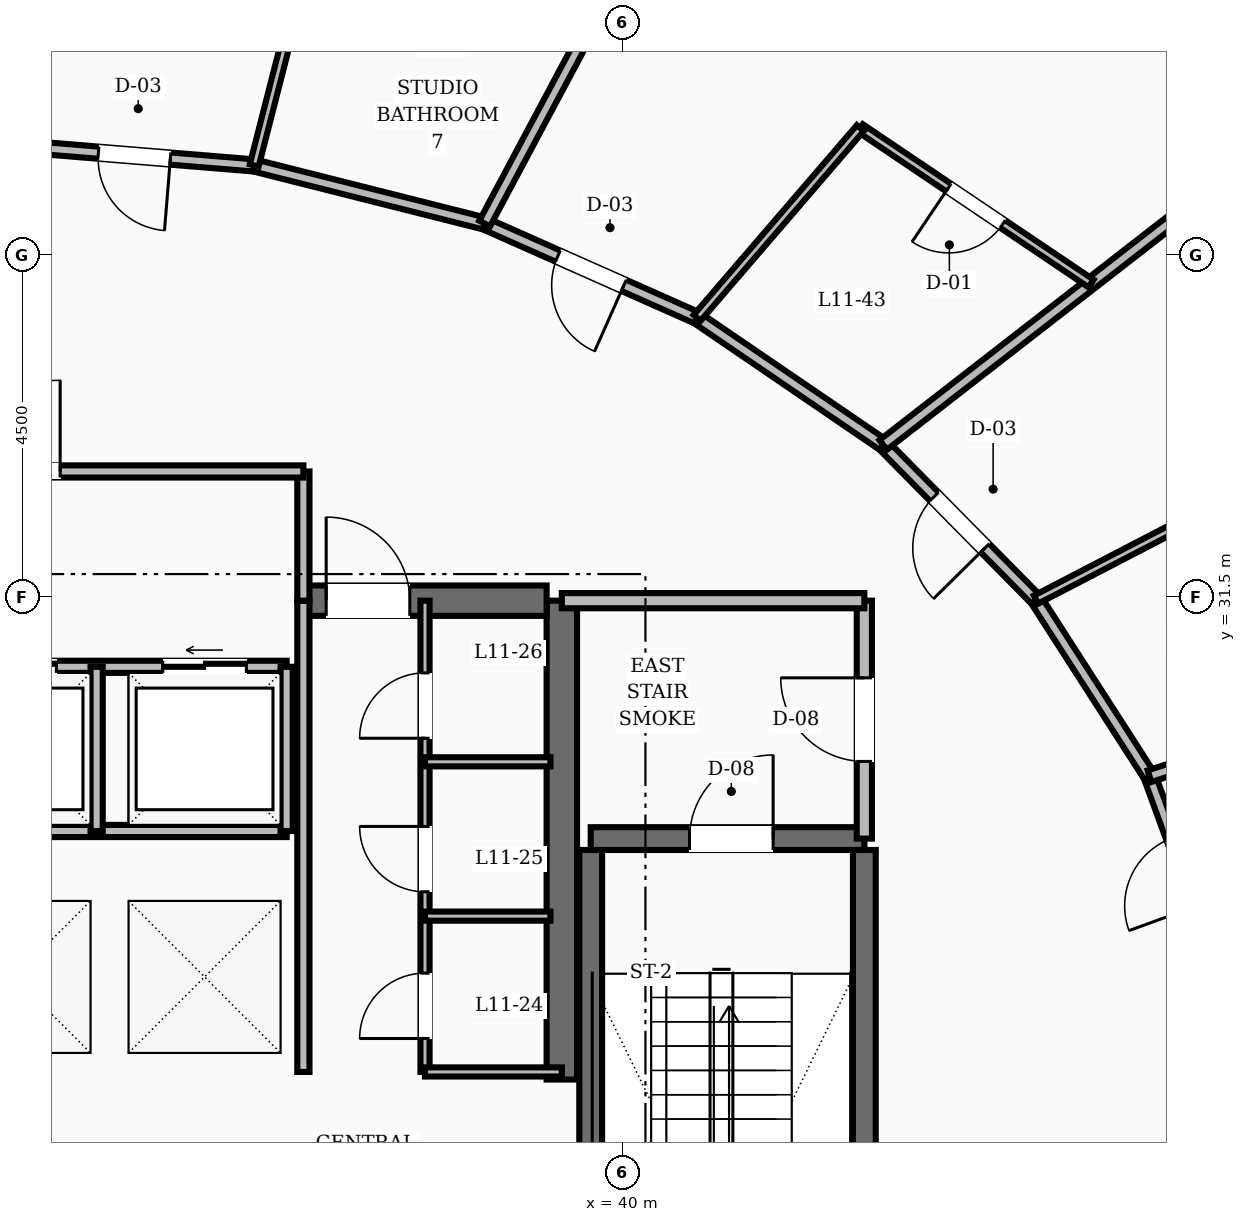
"""IFC4 building model, lengths in metres.
Left out: names, types, materials, properties, quantities, classifications, styles, units other than length and angle.
Written with IfcOpenShell. Run it as: python <this file> out.ifc"""

import sys

from ifc_helpers import new_model, si_unit, direction, frame, frame_2d, origin, place, context, subcontext, project, spatial, rectangle, extrude, element, fill, save


model = new_model("IFC4")
c1 = context("Model", 3, precision=1e-05, world=origin(), true_north=direction((0.0, 1.0)))
c2 = subcontext(c1, "Body", "Model", "MODEL_VIEW")
j1 = project(units=[si_unit("LENGTHUNIT", "METRE"), si_unit("PLANEANGLEUNIT", "RADIAN")], contexts=[c1])
p1 = place(None, origin())
s1 = spatial("IfcSite", under=j1, at=p1, CompositionType="ELEMENT")
p2 = place(p1, origin())
s2 = spatial("IfcBuilding", under=s1, at=p2, CompositionType="ELEMENT")
p3 = place(p2, frame((0.0, 0.0, 48.4)))
s3 = spatial("IfcBuildingStorey", under=s2, at=p3, CompositionType="ELEMENT", Elevation=48.4)
p4 = place(p3, frame((39.2, 25.15, 0.0), z_axis=(0.0, 0.0, 1.0), x_axis=(0.0, 1.0, 0.0)))
e1 = element("IfcWall", 1, at=p4, inside=s3, PredefinedType="SHEAR", context=c2, shape_type="SweptSolid", body=[
    extrude(rectangle(XDim=6.3, YDim=0.4, at=frame_2d((3.15, 0.0))), origin(), (0.0, 0.0, 1.0), 3.6),
])
p5 = place(p3, frame((35.8, 31.45, 0.0), z_axis=(0.0, 0.0, 1.0), x_axis=(1.0, 0.0, 0.0)))
e2 = element("IfcWall", 2, at=p5, inside=s3, PredefinedType="SHEAR", context=c2, shape_type="SweptSolid", body=[
    extrude(rectangle(XDim=3.2, YDim=0.4, at=frame_2d((1.6, 0.0))), origin(), (0.0, 0.0, 1.0), 3.6),
])
p6 = place(p5, frame((0.3, 0.0, 0.0)))
e3 = element("IfcOpeningElement", 3, at=p6, cuts=e2, PredefinedType="OPENING", context=c2, shape_type="SweptSolid", body=[
    extrude(rectangle(XDim=1.1, YDim=2.1, at=frame_2d((0.55, 1.05))), frame((0.0, 0.21, 0.0), z_axis=(0.0, -1.0, 0.0), x_axis=(1.0, 0.0, 0.0)), (0.0, 0.0, 1.0), 0.42),
])
for number, where, z_axis, x_axis in (
    (4, (43.18, 19.43, 0.0), (0.0, 0.0, 1.0), (0.0, 1.0, 0.0)),
    (5, (39.58, 19.43, 0.0), (0.0, 0.0, 1.0), (0.0, 1.0, 0.0)),
):
    element("IfcWall", number, at=place(p3, frame(where, z_axis=z_axis, x_axis=x_axis)), inside=s3, PredefinedType="SHEAR", context=c2, shape_type="SweptSolid", body=[
        extrude(rectangle(XDim=8.74, YDim=0.3, at=frame_2d((4.37, 0.0))), origin(), (0.0, 0.0, 1.0), 3.6),
    ])
p7 = place(p3, frame((39.58, 28.32, 0.0), z_axis=(0.0, 0.0, 1.0), x_axis=(1.0, 0.0, 0.0)))
e6 = element("IfcWall", 6, at=p7, inside=s3, PredefinedType="SHEAR", context=c2, shape_type="SweptSolid", body=[
    extrude(rectangle(XDim=3.6, YDim=0.3, at=frame_2d((1.8, 0.0))), origin(), (0.0, 0.0, 1.0), 3.6),
])
p8 = place(p7, frame((1.3, 0.0, 0.0)))
e7 = element("IfcOpeningElement", 7, at=p8, cuts=e6, PredefinedType="OPENING", context=c2, shape_type="SweptSolid", body=[
    extrude(rectangle(XDim=1.1, YDim=2.1, at=frame_2d((0.55, 1.05))), frame((0.0, 0.16, 0.0), z_axis=(0.0, -1.0, 0.0), x_axis=(1.0, 0.0, 0.0)), (0.0, 0.0, 1.0), 0.32),
])
p9 = place(p3, frame((43.18, 28.32, 0.0), z_axis=(0.0, 0.0, 1.0), x_axis=(0.0, 1.0, 0.0)))
e8 = element("IfcWall", 8, at=p9, inside=s3, PredefinedType="SOLIDWALL", context=c2, shape_type="SweptSolid", body=[
    extrude(rectangle(XDim=3.13, YDim=0.2, at=frame_2d((1.565, 0.0))), origin(), (0.0, 0.0, 1.0), 2.61),
])
p10 = place(p9, frame((1.015, 0.0, 0.0)))
e9 = element("IfcOpeningElement", 9, at=p10, cuts=e8, PredefinedType="OPENING", context=c2, shape_type="SweptSolid", body=[
    extrude(rectangle(XDim=1.1, YDim=2.1, at=frame_2d((0.55, 1.05))), frame((0.0, 0.11, 0.0), z_axis=(0.0, -1.0, 0.0), x_axis=(1.0, 0.0, 0.0)), (0.0, 0.0, 1.0), 0.22),
])
p11 = place(p3, frame((39.2, 31.45, 0.0), z_axis=(0.0, 0.0, 1.0), x_axis=(1.0, 0.0, 0.0)))
e10 = element("IfcWall", 10, at=p11, inside=s3, PredefinedType="SOLIDWALL", context=c2, shape_type="SweptSolid", body=[
    extrude(rectangle(XDim=3.98, YDim=0.2, at=frame_2d((1.99, 0.0))), origin(), (0.0, 0.0, 1.0), 2.61),
])
p12 = place(p3, frame((35.8, 25.25, 0.0), z_axis=(0.0, 0.0, 1.0), x_axis=(0.0, 1.0, 0.0)))
e11 = element("IfcWall", 11, at=p12, inside=s3, PredefinedType="SOLIDWALL", context=c2, shape_type="SweptSolid", body=[
    extrude(rectangle(XDim=6.2, YDim=0.16, at=frame_2d((3.1, 0.0))), origin(), (0.0, 0.0, 1.0), 2.61),
])
p13 = place(p3, frame((28.42, 30.58, 0.0), z_axis=(0.0, 0.0, 1.0), x_axis=(1.0, 0.0, 0.0)))
e12 = element("IfcWall", 12, at=p13, inside=s3, PredefinedType="SOLIDWALL", context=c2, shape_type="SweptSolid", body=[
    extrude(rectangle(XDim=7.16, YDim=0.16, at=frame_2d((3.58, 0.0))), origin(), (0.0, 0.0, 1.0), 2.61),
])
p14 = place(p13, frame((0.53, 0.0, 0.0)))
e13 = element("IfcOpeningElement", 13, at=p14, cuts=e12, PredefinedType="OPENING", context=c2, shape_type="SweptSolid", body=[
    extrude(rectangle(XDim=1.1, YDim=2.15, at=frame_2d((0.55, 1.075))), frame((0.0, 0.09, 0.0), z_axis=(0.0, -1.0, 0.0), x_axis=(1.0, 0.0, 0.0)), (0.0, 0.0, 1.0), 0.18),
])
p15 = place(p13, frame((3.03, 0.0, 0.0)))
e14 = element("IfcOpeningElement", 14, at=p15, cuts=e12, PredefinedType="OPENING", context=c2, shape_type="SweptSolid", body=[
    extrude(rectangle(XDim=1.1, YDim=2.15, at=frame_2d((0.55, 1.075))), frame((0.0, 0.09, 0.0), z_axis=(0.0, -1.0, 0.0), x_axis=(1.0, 0.0, 0.0)), (0.0, 0.0, 1.0), 0.18),
])
p16 = place(p13, frame((5.53, 0.0, 0.0)))
e15 = element("IfcOpeningElement", 15, at=p16, cuts=e12, PredefinedType="OPENING", context=c2, shape_type="SweptSolid", body=[
    extrude(rectangle(XDim=1.1, YDim=2.15, at=frame_2d((0.55, 1.075))), frame((0.0, 0.09, 0.0), z_axis=(0.0, -1.0, 0.0), x_axis=(1.0, 0.0, 0.0)), (0.0, 0.0, 1.0), 0.18),
])
p17 = place(p3, frame((28.42, 28.42, 0.0), z_axis=(0.0, 0.0, 1.0), x_axis=(1.0, 0.0, 0.0)))
e16 = element("IfcWall", 16, at=p17, inside=s3, PredefinedType="SOLIDWALL", context=c2, shape_type="SweptSolid", body=[
    extrude(rectangle(XDim=7.16, YDim=0.16, at=frame_2d((3.58, 0.0))), origin(), (0.0, 0.0, 1.0), 2.61),
])
for number, where, z_axis, x_axis in (
    (17, (33.08, 28.42, 0.0), (0.0, 0.0, 1.0), (0.0, 1.0, 0.0)),
    (18, (35.58, 28.42, 0.0), (0.0, 0.0, 1.0), (0.0, 1.0, 0.0)),
):
    element("IfcWall", number, at=place(p3, frame(where, z_axis=z_axis, x_axis=x_axis)), inside=s3, PredefinedType="SOLIDWALL", context=c2, shape_type="SweptSolid", body=[
        extrude(rectangle(XDim=2.16, YDim=0.16, at=frame_2d((1.08, 0.0))), origin(), (0.0, 0.0, 1.0), 2.61),
    ])
p18 = place(p3, frame((35.8, 31.45, 0.0), z_axis=(0.0, 0.0, 1.0), x_axis=(0.0, 1.0, 0.0)))
e19 = element("IfcWall", 19, at=p18, inside=s3, PredefinedType="SOLIDWALL", context=c2, shape_type="SweptSolid", body=[
    extrude(rectangle(XDim=1.7, YDim=0.16, at=frame_2d((0.85, 0.0))), origin(), (0.0, 0.0, 1.0), 2.61),
])
p19 = place(p3, frame((28.2, 33.15, 0.0), z_axis=(0.0, 0.0, 1.0), x_axis=(1.0, 0.0, 0.0)))
e20 = element("IfcWall", 20, at=p19, inside=s3, PredefinedType="SOLIDWALL", context=c2, shape_type="SweptSolid", body=[
    extrude(rectangle(XDim=7.6, YDim=0.16, at=frame_2d((3.8, 0.0))), origin(), (0.0, 0.0, 1.0), 2.61),
])
p20 = place(p19, frame((3.2, 0.0, 0.0)))
e21 = element("IfcOpeningElement", 21, at=p20, cuts=e20, PredefinedType="OPENING", context=c2, shape_type="SweptSolid", body=[
    extrude(rectangle(XDim=1.2, YDim=2.1, at=frame_2d((0.6, 1.05))), frame((0.0, 0.09, 0.0), z_axis=(0.0, -1.0, 0.0), x_axis=(1.0, 0.0, 0.0)), (0.0, 0.0, 1.0), 0.18),
])
p21 = place(p3, frame((37.4, 25.25, 0.0), z_axis=(0.0, 0.0, 1.0), x_axis=(0.0, 1.0, 0.0)))
e22 = element("IfcWall", 22, at=p21, inside=s3, PredefinedType="PARTITIONING", context=c2, shape_type="SweptSolid", body=[
    extrude(rectangle(XDim=6.2, YDim=0.12, at=frame_2d((3.1, 0.0))), origin(), (0.0, 0.0, 1.0), 2.61),
])
p22 = place(p21, frame((0.44, 0.0, 0.0)))
e23 = element("IfcOpeningElement", 23, at=p22, cuts=e22, PredefinedType="OPENING", context=c2, shape_type="SweptSolid", body=[
    extrude(rectangle(XDim=0.86, YDim=2.1, at=frame_2d((0.43, 1.05))), frame((0.0, 0.07, 0.0), z_axis=(0.0, -1.0, 0.0), x_axis=(1.0, 0.0, 0.0)), (0.0, 0.0, 1.0), 0.14),
])
p23 = place(p21, frame((2.37, 0.0, 0.0)))
e24 = element("IfcOpeningElement", 24, at=p23, cuts=e22, PredefinedType="OPENING", context=c2, shape_type="SweptSolid", body=[
    extrude(rectangle(XDim=0.86, YDim=2.1, at=frame_2d((0.43, 1.05))), frame((0.0, 0.07, 0.0), z_axis=(0.0, -1.0, 0.0), x_axis=(1.0, 0.0, 0.0)), (0.0, 0.0, 1.0), 0.14),
])
p24 = place(p21, frame((4.39, 0.0, 0.0)))
e25 = element("IfcOpeningElement", 25, at=p24, cuts=e22, PredefinedType="OPENING", context=c2, shape_type="SweptSolid", body=[
    extrude(rectangle(XDim=0.86, YDim=2.1, at=frame_2d((0.43, 1.05))), frame((0.0, 0.07, 0.0), z_axis=(0.0, -1.0, 0.0), x_axis=(1.0, 0.0, 0.0)), (0.0, 0.0, 1.0), 0.14),
])
p25 = place(p3, frame((37.4, 25.25, 0.0), z_axis=(0.0, 0.0, 1.0), x_axis=(1.0, 0.0, 0.0)))
e26 = element("IfcWall", 26, at=p25, inside=s3, PredefinedType="PARTITIONING", context=c2, shape_type="SweptSolid", body=[
    extrude(rectangle(XDim=1.8, YDim=0.12, at=frame_2d((0.9, 0.0))), origin(), (0.0, 0.0, 1.0), 2.61),
])
for number, where, z_axis, x_axis in (
    (27, (37.4, 27.3, 0.0), (0.0, 0.0, 1.0), (1.0, 0.0, 0.0)),
    (28, (37.4, 29.33, 0.0), (0.0, 0.0, 1.0), (1.0, 0.0, 0.0)),
):
    element("IfcWall", number, at=place(p3, frame(where, z_axis=z_axis, x_axis=x_axis)), inside=s3, PredefinedType="PARTITIONING", context=c2, shape_type="SweptSolid", body=[
        extrude(rectangle(XDim=1.65, YDim=0.12, at=frame_2d((0.825, 0.0))), origin(), (0.0, 0.0, 1.0), 2.61),
    ])
p26 = place(p3, frame((47.852, 26.621, 0.0), z_axis=(0.0, 0.0, 1.0), x_axis=(-0.342882618672, 0.939378257047, 0.0)))
e29 = element("IfcWall", 29, at=p26, inside=s3, PredefinedType="SOLIDWALL", context=c2, shape_type="SweptSolid", body=[
    extrude(rectangle(XDim=2.683, YDim=0.16, at=frame_2d((1.341, 0.0))), origin(), (0.0, 0.0, 1.0), 2.61),
])
p27 = place(p26, frame((0.866, 0.0, 0.0)))
e30 = element("IfcOpeningElement", 30, at=p27, cuts=e29, PredefinedType="OPENING", context=c2, shape_type="SweptSolid", body=[
    extrude(rectangle(XDim=0.95, YDim=2.1, at=frame_2d((0.475, 1.05))), frame((0.0, 0.09, 0.0), z_axis=(0.0, -1.0, 0.0), x_axis=(1.0, 0.0, 0.0)), (0.0, 0.0, 1.0), 0.18),
])
p28 = place(p3, frame((46.932, 29.141, 0.0), z_axis=(0.0, 0.0, 1.0), x_axis=(-0.540891657444, 0.841092274907, 0.0)))
e31 = element("IfcWall", 31, at=p28, inside=s3, PredefinedType="SOLIDWALL", context=c2, shape_type="SweptSolid", body=[
    extrude(rectangle(XDim=2.761, YDim=0.16, at=frame_2d((1.38, 0.0))), origin(), (0.0, 0.0, 1.0), 2.61),
])
p29 = place(p3, frame((45.438, 31.463, 0.0), z_axis=(0.0, 0.0, 1.0), x_axis=(-0.702569520063, 0.711615113301, 0.0)))
e32 = element("IfcWall", 32, at=p29, inside=s3, PredefinedType="SOLIDWALL", context=c2, shape_type="SweptSolid", body=[
    extrude(rectangle(XDim=2.861, YDim=0.16, at=frame_2d((1.43, 0.0))), origin(), (0.0, 0.0, 1.0), 2.61),
])
p30 = place(p29, frame((0.955, 0.0, 0.0)))
e33 = element("IfcOpeningElement", 33, at=p30, cuts=e32, PredefinedType="OPENING", context=c2, shape_type="SweptSolid", body=[
    extrude(rectangle(XDim=0.95, YDim=2.1, at=frame_2d((0.475, 1.05))), frame((0.0, 0.09, 0.0), z_axis=(0.0, -1.0, 0.0), x_axis=(1.0, 0.0, 0.0)), (0.0, 0.0, 1.0), 0.18),
])
p31 = place(p3, frame((43.428, 33.499, 0.0), z_axis=(0.0, 0.0, 1.0), x_axis=(-0.826112340767, 0.563505457323, 0.0)))
e34 = element("IfcWall", 34, at=p31, inside=s3, PredefinedType="SOLIDWALL", context=c2, shape_type="SweptSolid", body=[
    extrude(rectangle(XDim=2.965, YDim=0.16, at=frame_2d((1.482, 0.0))), origin(), (0.0, 0.0, 1.0), 2.61),
])
p32 = place(p3, frame((40.979, 35.17, 0.0), z_axis=(0.0, 0.0, 1.0), x_axis=(-0.913860932409, 0.406027334321, 0.0)))
e35 = element("IfcWall", 35, at=p32, inside=s3, PredefinedType="SOLIDWALL", context=c2, shape_type="SweptSolid", body=[
    extrude(rectangle(XDim=3.058, YDim=0.16, at=frame_2d((1.529, 0.0))), origin(), (0.0, 0.0, 1.0), 2.61),
])
p33 = place(p32, frame((1.054, 0.0, 0.0)))
e36 = element("IfcOpeningElement", 36, at=p33, cuts=e35, PredefinedType="OPENING", context=c2, shape_type="SweptSolid", body=[
    extrude(rectangle(XDim=0.95, YDim=2.1, at=frame_2d((0.475, 1.05))), frame((0.0, 0.09, 0.0), z_axis=(0.0, -1.0, 0.0), x_axis=(1.0, 0.0, 0.0)), (0.0, 0.0, 1.0), 0.18),
])
p34 = place(p3, frame((38.185, 36.411, 0.0), z_axis=(0.0, 0.0, 1.0), x_axis=(-0.969653665365, 0.244482656326, 0.0)))
e37 = element("IfcWall", 37, at=p34, inside=s3, PredefinedType="SOLIDWALL", context=c2, shape_type="SweptSolid", body=[
    extrude(rectangle(XDim=3.127, YDim=0.16, at=frame_2d((1.563, 0.0))), origin(), (0.0, 0.0, 1.0), 2.61),
])
p35 = place(p3, frame((35.153, 37.176, 0.0), z_axis=(0.0, 0.0, 1.0), x_axis=(-0.996661331307, 0.081646743207, 0.0)))
e38 = element("IfcWall", 38, at=p35, inside=s3, PredefinedType="SOLIDWALL", context=c2, shape_type="SweptSolid", body=[
    extrude(rectangle(XDim=3.164, YDim=0.16, at=frame_2d((1.582, 0.0))), origin(), (0.0, 0.0, 1.0), 2.61),
])
p36 = place(p35, frame((1.107, 0.0, 0.0)))
e39 = element("IfcOpeningElement", 39, at=p36, cuts=e38, PredefinedType="OPENING", context=c2, shape_type="SweptSolid", body=[
    extrude(rectangle(XDim=0.95, YDim=2.1, at=frame_2d((0.475, 1.05))), frame((0.0, 0.09, 0.0), z_axis=(0.0, -1.0, 0.0), x_axis=(1.0, 0.0, 0.0)), (0.0, 0.0, 1.0), 0.18),
])
p37 = place(p3, frame((46.932, 29.141, 0.0), z_axis=(0.0, 0.0, 1.0), x_axis=(0.951948128821, 0.306259301956, 0.0)))
e40 = element("IfcWall", 40, at=p37, inside=s3, PredefinedType="SOLIDWALL", context=c2, shape_type="SweptSolid", body=[
    extrude(rectangle(XDim=9.826, YDim=0.16, at=frame_2d((4.913, 0.0))), origin(), (0.0, 0.0, 1.0), 2.61),
])
p38 = place(p3, frame((45.438, 31.463, 0.0), z_axis=(0.0, 0.0, 1.0), x_axis=(0.887571866108, 0.460669276699, 0.0)))
e41 = element("IfcWall", 41, at=p38, inside=s3, PredefinedType="PARTITIONING", context=c2, shape_type="SweptSolid", body=[
    extrude(rectangle(XDim=3.622, YDim=0.12, at=frame_2d((1.811, 0.0))), origin(), (0.0, 0.0, 1.0), 2.61),
])
p39 = place(p3, frame((43.428, 33.499, 0.0), z_axis=(0.0, 0.0, 1.0), x_axis=(0.789749576514, 0.613429381751, 0.0)))
e42 = element("IfcWall", 42, at=p39, inside=s3, PredefinedType="SOLIDWALL", context=c2, shape_type="SweptSolid", body=[
    extrude(rectangle(XDim=9.061, YDim=0.16, at=frame_2d((4.531, 0.0))), origin(), (0.0, 0.0, 1.0), 2.61),
])
p40 = place(p3, frame((46.163, 35.623, 0.0), z_axis=(0.0, 0.0, 1.0), x_axis=(-0.829423679088, 0.558620050274, 0.0)))
e43 = element("IfcWall", 43, at=p40, inside=s3, PredefinedType="PARTITIONING", context=c2, shape_type="SweptSolid", body=[
    extrude(rectangle(XDim=3.659, YDim=0.12, at=frame_2d((1.83, 0.0))), origin(), (0.0, 0.0, 1.0), 2.61),
])
p41 = place(p40, frame((1.4, 0.0, 0.0)))
e44 = element("IfcOpeningElement", 44, at=p41, cuts=e43, PredefinedType="OPENING", context=c2, shape_type="SweptSolid", body=[
    extrude(rectangle(XDim=0.86, YDim=2.1, at=frame_2d((0.43, 1.05))), frame((0.0, 0.07, 0.0), z_axis=(0.0, -1.0, 0.0), x_axis=(1.0, 0.0, 0.0)), (0.0, 0.0, 1.0), 0.14),
])
p42 = place(p3, frame((40.979, 35.17, 0.0), z_axis=(0.0, 0.0, 1.0), x_axis=(0.652169620861, 0.758073074067, 0.0)))
e45 = element("IfcWall", 45, at=p42, inside=s3, PredefinedType="PARTITIONING", context=c2, shape_type="SweptSolid", body=[
    extrude(rectangle(XDim=3.294, YDim=0.12, at=frame_2d((1.647, 0.0))), origin(), (0.0, 0.0, 1.0), 2.61),
])
p43 = place(p3, frame((38.185, 36.411, 0.0), z_axis=(0.0, 0.0, 1.0), x_axis=(0.47056512842, 0.882365264454, 0.0)))
e46 = element("IfcWall", 46, at=p43, inside=s3, PredefinedType="SOLIDWALL", context=c2, shape_type="SweptSolid", body=[
    extrude(rectangle(XDim=8.226, YDim=0.16, at=frame_2d((4.113, 0.0))), origin(), (0.0, 0.0, 1.0), 2.61),
])
p44 = place(p3, frame((35.153, 37.176, 0.0), z_axis=(0.0, 0.0, 1.0), x_axis=(0.248085594178, 0.968738116294, 0.0)))
e47 = element("IfcWall", 47, at=p44, inside=s3, PredefinedType="PARTITIONING", context=c2, shape_type="SweptSolid", body=[
    extrude(rectangle(XDim=3.041, YDim=0.12, at=frame_2d((1.521, 0.0))), origin(), (0.0, 0.0, 1.0), 2.61),
])
p45 = place(p8, origin())
e48 = element("IfcDoor", 48, at=p45, inside=s3, OperationType="SINGLE_SWING_RIGHT", PredefinedType="DOOR", context=c2, shape_type="SweptSolid", body=[
    extrude(rectangle(XDim=1.1, YDim=2.1, at=frame_2d((0.55, 1.05))), frame((0.0, 0.025, 0.0), z_axis=(0.0, -1.0, 0.0), x_axis=(1.0, 0.0, 0.0)), (0.0, 0.0, 1.0), 0.05),
])
fill(e7, e48)
p46 = place(p10, origin())
e49 = element("IfcDoor", 49, at=p46, inside=s3, OperationType="SINGLE_SWING_RIGHT", PredefinedType="DOOR", context=c2, shape_type="SweptSolid", body=[
    extrude(rectangle(XDim=1.1, YDim=2.1, at=frame_2d((0.55, 1.05))), frame((0.0, 0.025, 0.0), z_axis=(0.0, -1.0, 0.0), x_axis=(1.0, 0.0, 0.0)), (0.0, 0.0, 1.0), 0.05),
])
fill(e9, e49)
p47 = place(p6, origin())
e50 = element("IfcDoor", 50, at=p47, inside=s3, OperationType="SINGLE_SWING_LEFT", PredefinedType="DOOR", context=c2, shape_type="SweptSolid", body=[
    extrude(rectangle(XDim=1.1, YDim=2.1, at=frame_2d((0.55, 1.05))), frame((0.0, 0.025, 0.0), z_axis=(0.0, -1.0, 0.0), x_axis=(1.0, 0.0, 0.0)), (0.0, 0.0, 1.0), 0.05),
])
fill(e3, e50)
p48 = place(p15, origin())
e51 = element("IfcDoor", 51, at=p48, inside=s3, OperationType="SLIDING_TO_LEFT", PredefinedType="DOOR", context=c2, shape_type="SweptSolid", body=[
    extrude(rectangle(XDim=1.1, YDim=2.15, at=frame_2d((0.55, 1.075))), frame((0.0, 0.025, 0.0), z_axis=(0.0, -1.0, 0.0), x_axis=(1.0, 0.0, 0.0)), (0.0, 0.0, 1.0), 0.05),
])
fill(e14, e51)
p49 = place(p16, origin())
e52 = element("IfcDoor", 52, at=p49, inside=s3, OperationType="SLIDING_TO_LEFT", PredefinedType="DOOR", context=c2, shape_type="SweptSolid", body=[
    extrude(rectangle(XDim=1.1, YDim=2.15, at=frame_2d((0.55, 1.075))), frame((0.0, 0.025, 0.0), z_axis=(0.0, -1.0, 0.0), x_axis=(1.0, 0.0, 0.0)), (0.0, 0.0, 1.0), 0.05),
])
fill(e15, e52)
p50 = place(p20, origin())
e53 = element("IfcDoor", 53, at=p50, inside=s3, OperationType="SINGLE_SWING_RIGHT", PredefinedType="DOOR", context=c2, shape_type="SweptSolid", body=[
    extrude(rectangle(XDim=1.2, YDim=2.1, at=frame_2d((0.6, 1.05))), frame((0.0, 0.025, 0.0), z_axis=(0.0, -1.0, 0.0), x_axis=(1.0, 0.0, 0.0)), (0.0, 0.0, 1.0), 0.05),
])
fill(e21, e53)
p51 = place(p22, origin())
e54 = element("IfcDoor", 54, at=p51, inside=s3, OperationType="SINGLE_SWING_LEFT", PredefinedType="DOOR", context=c2, shape_type="SweptSolid", body=[
    extrude(rectangle(XDim=0.86, YDim=2.1, at=frame_2d((0.43, 1.05))), frame((0.0, 0.025, 0.0), z_axis=(0.0, -1.0, 0.0), x_axis=(1.0, 0.0, 0.0)), (0.0, 0.0, 1.0), 0.05),
])
fill(e23, e54)
p52 = place(p23, origin())
e55 = element("IfcDoor", 55, at=p52, inside=s3, OperationType="SINGLE_SWING_RIGHT", PredefinedType="DOOR", context=c2, shape_type="SweptSolid", body=[
    extrude(rectangle(XDim=0.86, YDim=2.1, at=frame_2d((0.43, 1.05))), frame((0.0, 0.025, 0.0), z_axis=(0.0, -1.0, 0.0), x_axis=(1.0, 0.0, 0.0)), (0.0, 0.0, 1.0), 0.05),
])
fill(e24, e55)
p53 = place(p24, origin())
e56 = element("IfcDoor", 56, at=p53, inside=s3, OperationType="SINGLE_SWING_LEFT", PredefinedType="DOOR", context=c2, shape_type="SweptSolid", body=[
    extrude(rectangle(XDim=0.86, YDim=2.1, at=frame_2d((0.43, 1.05))), frame((0.0, 0.025, 0.0), z_axis=(0.0, -1.0, 0.0), x_axis=(1.0, 0.0, 0.0)), (0.0, 0.0, 1.0), 0.05),
])
fill(e25, e56)
p54 = place(p30, origin())
e57 = element("IfcDoor", 57, at=p54, inside=s3, OperationType="SINGLE_SWING_LEFT", PredefinedType="DOOR", context=c2, shape_type="SweptSolid", body=[
    extrude(rectangle(XDim=0.95, YDim=2.1, at=frame_2d((0.475, 1.05))), frame((0.0, 0.025, 0.0), z_axis=(0.0, -1.0, 0.0), x_axis=(1.0, 0.0, 0.0)), (0.0, 0.0, 1.0), 0.05),
])
fill(e33, e57)
p55 = place(p41, origin())
e58 = element("IfcDoor", 58, at=p55, inside=s3, OperationType="SINGLE_SWING_RIGHT", PredefinedType="DOOR", context=c2, shape_type="SweptSolid", body=[
    extrude(rectangle(XDim=0.86, YDim=2.1, at=frame_2d((0.43, 1.05))), frame((0.0, 0.025, 0.0), z_axis=(0.0, -1.0, 0.0), x_axis=(1.0, 0.0, 0.0)), (0.0, 0.0, 1.0), 0.05),
])
fill(e44, e58)
p56 = place(p33, origin())
e59 = element("IfcDoor", 59, at=p56, inside=s3, OperationType="SINGLE_SWING_LEFT", PredefinedType="DOOR", context=c2, shape_type="SweptSolid", body=[
    extrude(rectangle(XDim=0.95, YDim=2.1, at=frame_2d((0.475, 1.05))), frame((0.0, 0.025, 0.0), z_axis=(0.0, -1.0, 0.0), x_axis=(1.0, 0.0, 0.0)), (0.0, 0.0, 1.0), 0.05),
])
fill(e36, e59)
p57 = place(p36, origin())
e60 = element("IfcDoor", 60, at=p57, inside=s3, OperationType="SINGLE_SWING_LEFT", PredefinedType="DOOR", context=c2, shape_type="SweptSolid", body=[
    extrude(rectangle(XDim=0.95, YDim=2.1, at=frame_2d((0.475, 1.05))), frame((0.0, 0.025, 0.0), z_axis=(0.0, -1.0, 0.0), x_axis=(1.0, 0.0, 0.0)), (0.0, 0.0, 1.0), 0.05),
])
fill(e39, e60)
save(model, sys.argv[1])
